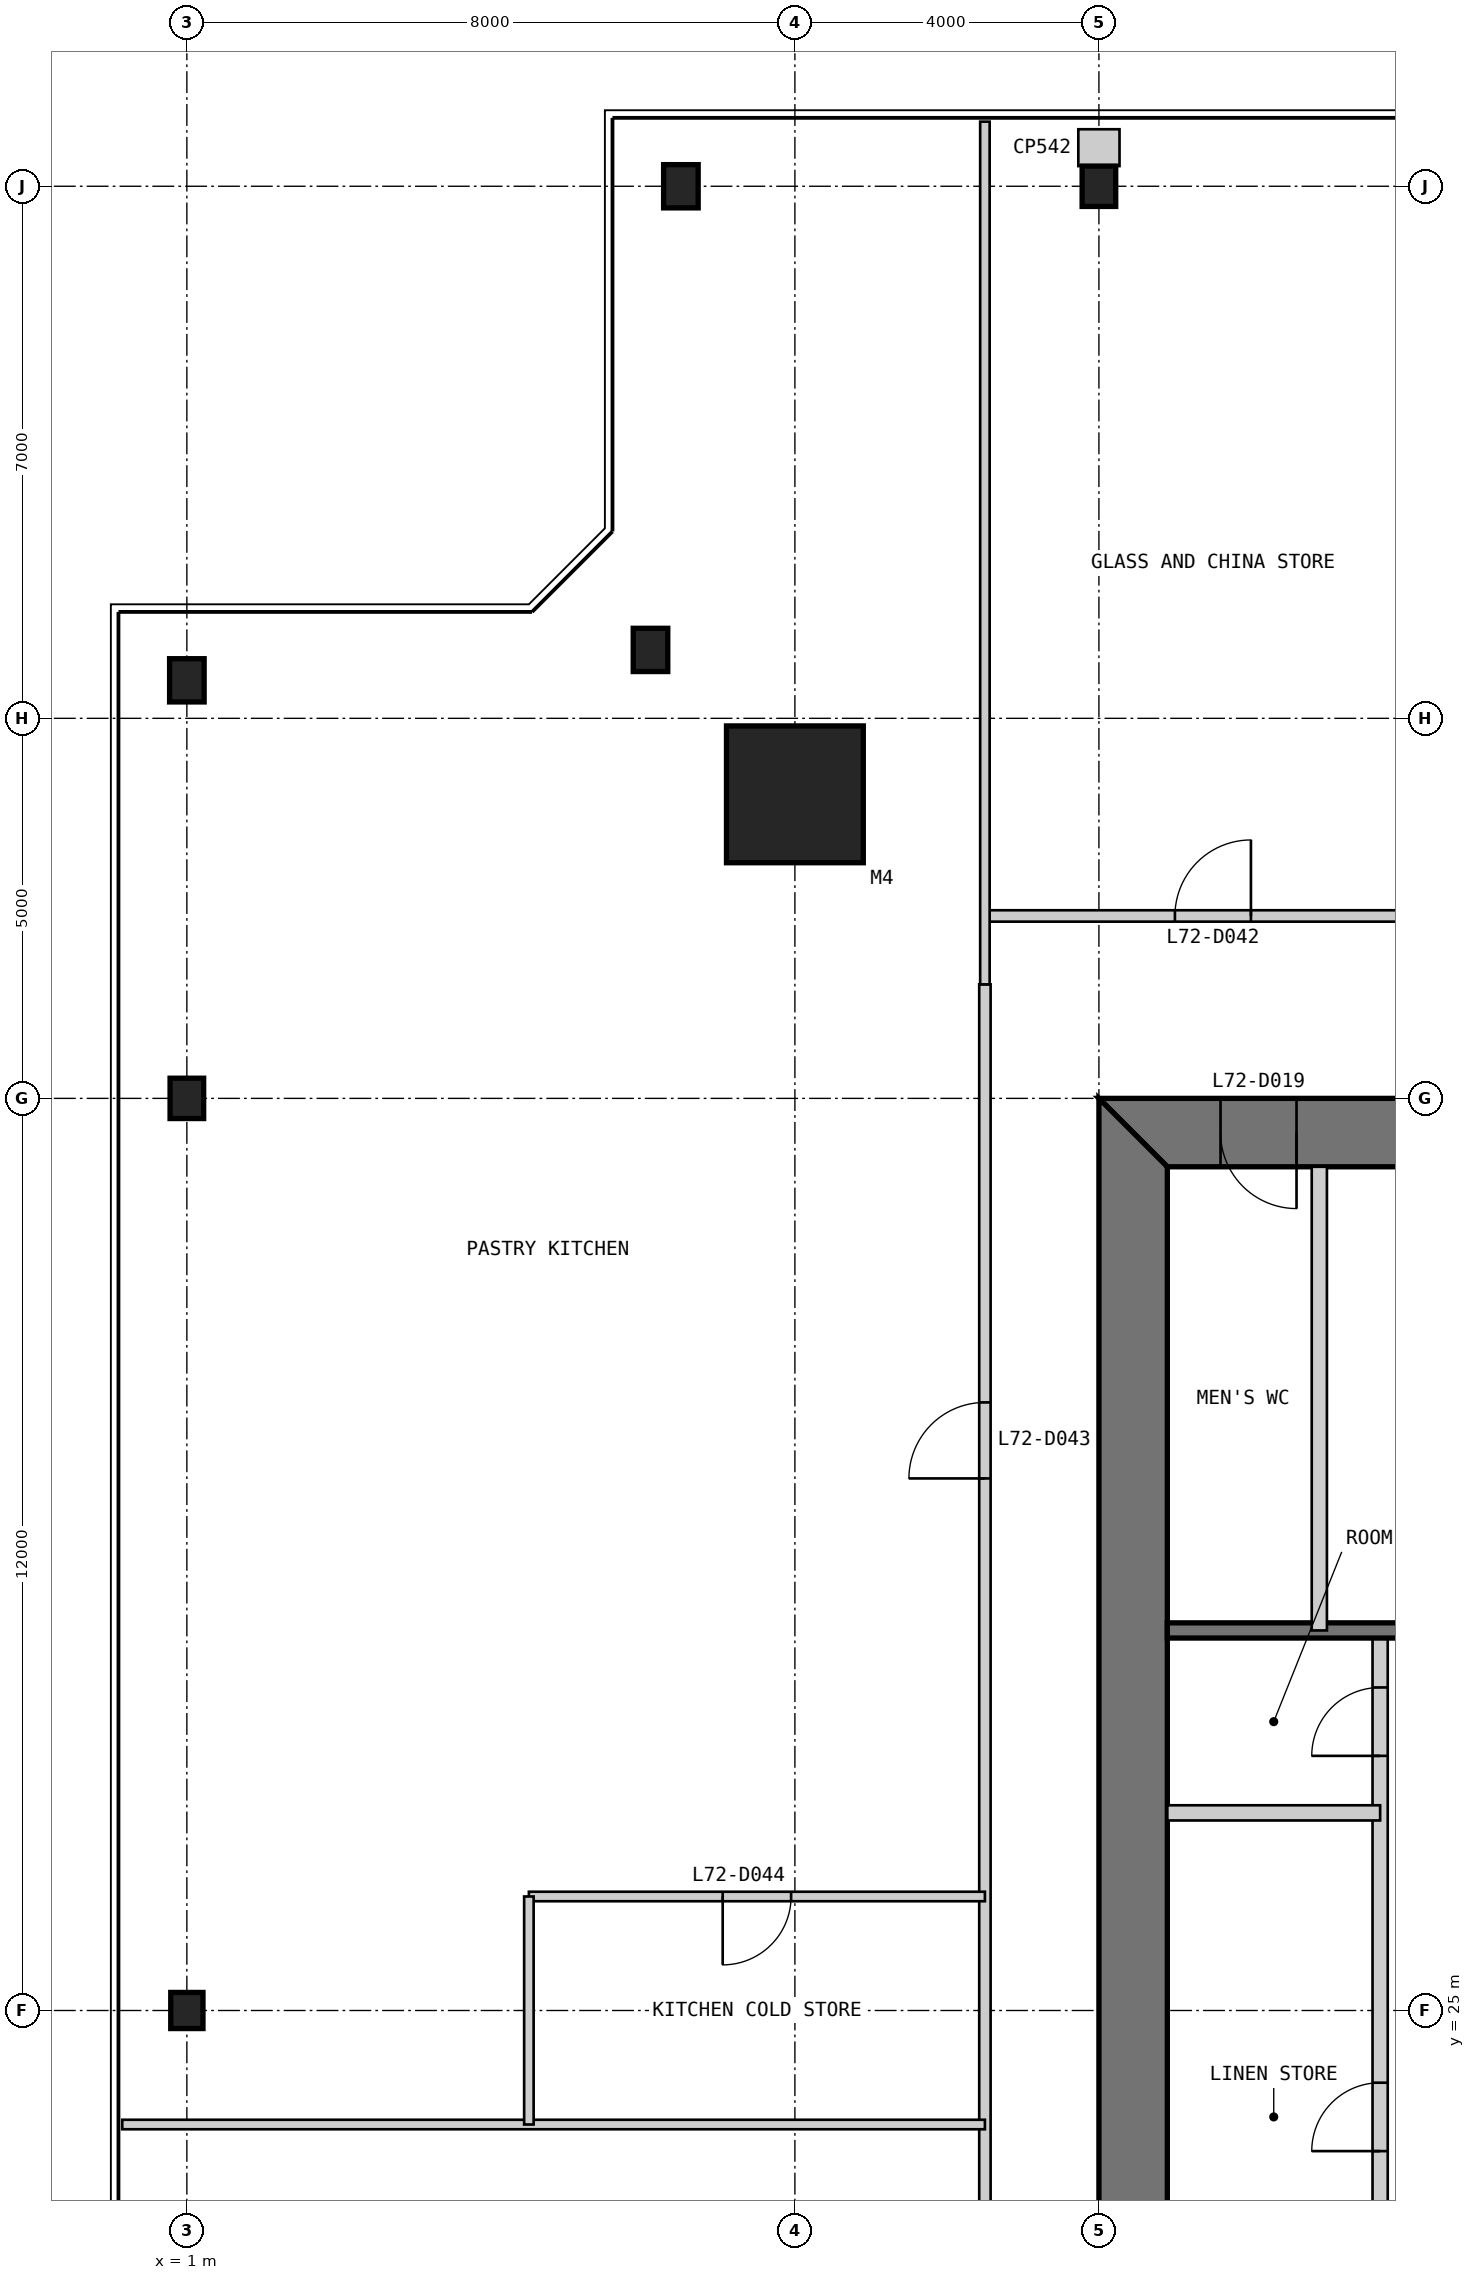
"""IFC4 building model, lengths in metres.
Left out: names, types, materials, properties, quantities, classifications, styles, units other than length and angle.
Written with IfcOpenShell. Run it as: python <this file> out.ifc"""

import sys

from ifc_helpers import new_model, si_unit, direction, frame, frame_2d, origin, origin_2d, place, context, subcontext, project, spatial, polyline, rectangle, i_section, outline, extrude, element, fill, save


model = new_model("IFC4")
c1 = context("Model", 3, precision=1e-05, world=origin(), true_north=direction((0.0, 1.0)))
c2 = subcontext(c1, "Body", "Model", "MODEL_VIEW")
j1 = project(units=[si_unit("LENGTHUNIT", "METRE"), si_unit("PLANEANGLEUNIT", "RADIAN")], contexts=[c1])
p1 = place(None, origin())
s1 = spatial("IfcSite", under=j1, at=p1, CompositionType="ELEMENT")
p2 = place(p1, origin())
s2 = spatial("IfcBuilding", under=s1, at=p2, CompositionType="ELEMENT")
p3 = place(p2, frame((0.0, 0.0, 296.8)))
s3 = spatial("IfcBuildingStorey", under=s2, at=p3, CompositionType="ELEMENT", Elevation=296.8)
p4 = place(p3, frame((9.0, 41.0, 0.0), z_axis=(0.0, 0.0, 1.0), x_axis=(1.0, 0.0, 0.0)))
e1 = element("IfcColumn", 1, at=p4, inside=s3, PredefinedType="COLUMN", context=c2, shape_type="SweptSolid", body=[
    extrude(rectangle(XDim=1.8, YDim=1.8, at=origin_2d()), origin(), (0.0, 0.0, 1.0), 5.0),
])
p5 = place(p3, frame((13.0, 49.0, 0.0), z_axis=(0.0, 0.0, 1.0), x_axis=(1.0, 0.0, 0.0)))
e2 = element("IfcColumn", 2, at=p5, inside=s3, PredefinedType="COLUMN", context=c2, shape_type="SweptSolid", body=[
    extrude(i_section(OverallWidth=0.442, OverallDepth=0.531, WebThickness=0.066, FlangeThickness=0.106, at=origin_2d()), origin(), (0.0, 0.0, 1.0), 5.0),
])
for number, where, z_axis, x_axis in (
    (3, (7.5, 49.0, 0.0), (0.0, 0.0, 1.0), (1.0, 0.0, 0.0)),
    (4, (7.1, 42.9, 0.0), (0.0, 0.0, 1.0), (1.0, 0.0, 0.0)),
    (5, (1.0, 42.5, 0.0), (0.0, 0.0, 1.0), (1.0, 0.0, 0.0)),
):
    element("IfcColumn", number, at=place(p3, frame(where, z_axis=z_axis, x_axis=x_axis)), inside=s3, PredefinedType="COLUMN", context=c2, shape_type="SweptSolid", body=[
        extrude(i_section(OverallWidth=0.455, OverallDepth=0.569, WebThickness=0.078, FlangeThickness=0.125, at=origin_2d()), origin(), (0.0, 0.0, 1.0), 5.0),
    ])
p6 = place(p3, frame((1.0, 37.0, 0.0), z_axis=(0.0, 0.0, 1.0), x_axis=(1.0, 0.0, 0.0)))
e6 = element("IfcColumn", 6, at=p6, inside=s3, PredefinedType="COLUMN", context=c2, shape_type="SweptSolid", body=[
    extrude(i_section(OverallWidth=0.442, OverallDepth=0.531, WebThickness=0.066, FlangeThickness=0.106, at=origin_2d()), origin(), (0.0, 0.0, 1.0), 5.0),
])
p7 = place(p3, frame((1.0, 25.0, 0.0), z_axis=(0.0, 0.0, 1.0), x_axis=(1.0, 0.0, 0.0)))
e7 = element("IfcColumn", 7, at=p7, inside=s3, PredefinedType="COLUMN", context=c2, shape_type="SweptSolid", body=[
    extrude(i_section(OverallWidth=0.424, OverallDepth=0.475, WebThickness=0.048, FlangeThickness=0.077, at=origin_2d()), origin(), (0.0, 0.0, 1.0), 5.0),
])
p8 = place(p3, frame((37.0, 36.55, 0.0), z_axis=(0.0, 0.0, 1.0), x_axis=(-1.0, 0.0, 0.0)))
e8 = element("IfcWall", 8, at=p8, inside=s3, PredefinedType="SHEAR", context=c2, shape_type="SweptSolid", body=[
    extrude(outline(polyline([(0.0, -0.45), (24.0, -0.45), (23.1, 0.45), (0.9, 0.45), (0.0, -0.45)])), origin(), (0.0, 0.0, 1.0), 5.0),
])
p9 = place(p8, frame((4.9, 0.0, 0.0)))
e9 = element("IfcOpeningElement", 9, at=p9, cuts=e8, PredefinedType="OPENING", context=c2, shape_type="SweptSolid", body=[
    extrude(rectangle(XDim=1.0, YDim=2.2, at=frame_2d((0.5, 1.1))), frame((0.0, 0.46, 0.0), z_axis=(0.0, -1.0, 0.0), x_axis=(1.0, 0.0, 0.0)), (0.0, 0.0, 1.0), 0.92),
])
p10 = place(p8, frame((8.9, 0.0, 0.0)))
e10 = element("IfcOpeningElement", 10, at=p10, cuts=e8, PredefinedType="OPENING", context=c2, shape_type="SweptSolid", body=[
    extrude(rectangle(XDim=1.1, YDim=2.2, at=frame_2d((0.55, 1.1))), frame((0.0, 0.46, 0.0), z_axis=(0.0, -1.0, 0.0), x_axis=(1.0, 0.0, 0.0)), (0.0, 0.0, 1.0), 0.92),
])
p11 = place(p8, frame((15.05, 0.0, 0.0)))
e11 = element("IfcOpeningElement", 11, at=p11, cuts=e8, PredefinedType="OPENING", context=c2, shape_type="SweptSolid", body=[
    extrude(rectangle(XDim=0.9, YDim=2.2, at=frame_2d((0.45, 1.1))), frame((0.0, 0.46, 0.0), z_axis=(0.0, -1.0, 0.0), x_axis=(1.0, 0.0, 0.0)), (0.0, 0.0, 1.0), 0.92),
])
p12 = place(p8, frame((17.9, 0.0, 0.0)))
e12 = element("IfcOpeningElement", 12, at=p12, cuts=e8, PredefinedType="OPENING", context=c2, shape_type="SweptSolid", body=[
    extrude(rectangle(XDim=1.0, YDim=2.2, at=frame_2d((0.5, 1.1))), frame((0.0, 0.46, 0.0), z_axis=(0.0, -1.0, 0.0), x_axis=(1.0, 0.0, 0.0)), (0.0, 0.0, 1.0), 0.92),
])
p13 = place(p8, frame((21.4, 0.0, 0.0)))
e13 = element("IfcOpeningElement", 13, at=p13, cuts=e8, PredefinedType="OPENING", context=c2, shape_type="SweptSolid", body=[
    extrude(rectangle(XDim=1.0, YDim=2.2, at=frame_2d((0.5, 1.1))), frame((0.0, 0.46, 0.0), z_axis=(0.0, -1.0, 0.0), x_axis=(1.0, 0.0, 0.0)), (0.0, 0.0, 1.0), 0.92),
])
p14 = place(p3, frame((13.45, 36.1, 0.0), z_axis=(0.0, 0.0, 1.0), x_axis=(0.0, -1.0, 0.0)))
e14 = element("IfcWall", 14, at=p14, inside=s3, PredefinedType="SHEAR", context=c2, shape_type="SweptSolid", body=[
    extrude(outline(polyline([(-0.9, -0.45), (23.1, -0.45), (22.2, 0.45), (0.0, 0.45), (-0.9, -0.45)])), origin(), (0.0, 0.0, 1.0), 5.0),
])
p15 = place(p14, frame((20.2, 0.0, 0.0)))
e15 = element("IfcOpeningElement", 15, at=p15, cuts=e14, PredefinedType="OPENING", context=c2, shape_type="SweptSolid", body=[
    extrude(rectangle(XDim=1.0, YDim=2.2, at=frame_2d((0.5, 1.1))), frame((0.0, 0.46, 0.0), z_axis=(0.0, -1.0, 0.0), x_axis=(1.0, 0.0, 0.0)), (0.0, 0.0, 1.0), 0.92),
])
p16 = place(p14, frame((17.25, 0.0, 0.0)))
e16 = element("IfcOpeningElement", 16, at=p16, cuts=e14, PredefinedType="OPENING", context=c2, shape_type="SweptSolid", body=[
    extrude(rectangle(XDim=0.9, YDim=2.2, at=frame_2d((0.45, 1.1))), frame((0.0, 0.46, 0.0), z_axis=(0.0, -1.0, 0.0), x_axis=(1.0, 0.0, 0.0)), (0.0, 0.0, 1.0), 0.92),
])
p17 = place(p3, frame((16.7, 13.9, 0.0), z_axis=(0.0, 0.0, 1.0), x_axis=(0.0, 1.0, 0.0)))
e17 = element("IfcWall", 17, at=p17, inside=s3, PredefinedType="PARTITIONING", context=c2, shape_type="SweptSolid", body=[
    extrude(rectangle(XDim=16.1, YDim=0.2, at=frame_2d((8.05, 0.0))), origin(), (0.0, 0.0, 1.0), 4.8),
])
p18 = place(p17, frame((9.25, 0.0, 0.0)))
e18 = element("IfcOpeningElement", 18, at=p18, cuts=e17, PredefinedType="OPENING", context=c2, shape_type="SweptSolid", body=[
    extrude(rectangle(XDim=0.9, YDim=2.2, at=frame_2d((0.45, 1.1))), frame((0.0, 0.11, 0.0), z_axis=(0.0, -1.0, 0.0), x_axis=(1.0, 0.0, 0.0)), (0.0, 0.0, 1.0), 0.22),
])
p19 = place(p17, frame((14.45, 0.0, 0.0)))
e19 = element("IfcOpeningElement", 19, at=p19, cuts=e17, PredefinedType="OPENING", context=c2, shape_type="SweptSolid", body=[
    extrude(rectangle(XDim=0.9, YDim=2.2, at=frame_2d((0.45, 1.1))), frame((0.0, 0.11, 0.0), z_axis=(0.0, -1.0, 0.0), x_axis=(1.0, 0.0, 0.0)), (0.0, 0.0, 1.0), 0.22),
])
p20 = place(p3, frame((13.9, 27.6, 0.0), z_axis=(0.0, 0.0, 1.0), x_axis=(1.0, 0.0, 0.0)))
e20 = element("IfcWall", 20, at=p20, inside=s3, PredefinedType="PARTITIONING", context=c2, shape_type="SweptSolid", body=[
    extrude(rectangle(XDim=2.8, YDim=0.2, at=frame_2d((1.4, 0.0))), origin(), (0.0, 0.0, 1.0), 4.8),
])
p21 = place(p3, frame((29.7, 30.0, 0.0), z_axis=(0.0, 0.0, 1.0), x_axis=(-1.0, 0.0, 0.0)))
e21 = element("IfcWall", 21, at=p21, inside=s3, PredefinedType="SOLIDWALL", context=c2, shape_type="SweptSolid", body=[
    extrude(rectangle(XDim=15.8, YDim=0.2, at=frame_2d((7.9, 0.0))), origin(), (0.0, 0.0, 1.0), 4.8),
])
p22 = place(p3, frame((15.9, 36.1, 0.0), z_axis=(0.0, 0.0, 1.0), x_axis=(0.0, -1.0, 0.0)))
e22 = element("IfcWall", 22, at=p22, inside=s3, PredefinedType="PARTITIONING", context=c2, shape_type="SweptSolid", body=[
    extrude(rectangle(XDim=6.1, YDim=0.2, at=frame_2d((3.05, 0.0))), origin(), (0.0, 0.0, 1.0), 4.8),
])
p23 = place(p3, frame((38.5, 39.4, 0.0), z_axis=(0.0, 0.0, 1.0), x_axis=(-1.0, 0.0, 0.0)))
e23 = element("IfcWall", 23, at=p23, inside=s3, PredefinedType="PARTITIONING", context=c2, shape_type="SweptSolid", body=[
    extrude(rectangle(XDim=27.0, YDim=0.15, at=frame_2d((13.5, 0.0))), origin(), (0.0, 0.0, 1.0), 4.8),
])
p24 = place(p23, frame((0.25, 0.0, 0.0)))
e24 = element("IfcOpeningElement", 24, at=p24, cuts=e23, PredefinedType="OPENING", context=c2, shape_type="SweptSolid", body=[
    extrude(rectangle(XDim=1.0, YDim=2.2, at=frame_2d((0.5, 1.1))), frame((0.0, 0.085, 0.0), z_axis=(0.0, -1.0, 0.0), x_axis=(1.0, 0.0, 0.0)), (0.0, 0.0, 1.0), 0.17),
])
p25 = place(p23, frame((10.75, 0.0, 0.0)))
e25 = element("IfcOpeningElement", 25, at=p25, cuts=e23, PredefinedType="OPENING", context=c2, shape_type="SweptSolid", body=[
    extrude(rectangle(XDim=1.0, YDim=2.2, at=frame_2d((0.5, 1.1))), frame((0.0, 0.085, 0.0), z_axis=(0.0, -1.0, 0.0), x_axis=(1.0, 0.0, 0.0)), (0.0, 0.0, 1.0), 0.17),
])
p26 = place(p23, frame((13.0, 0.0, 0.0)))
e26 = element("IfcOpeningElement", 26, at=p26, cuts=e23, PredefinedType="OPENING", context=c2, shape_type="SweptSolid", body=[
    extrude(rectangle(XDim=1.0, YDim=2.2, at=frame_2d((0.5, 1.1))), frame((0.0, 0.085, 0.0), z_axis=(0.0, -1.0, 0.0), x_axis=(1.0, 0.0, 0.0)), (0.0, 0.0, 1.0), 0.17),
])
p27 = place(p23, frame((16.0, 0.0, 0.0)))
e27 = element("IfcOpeningElement", 27, at=p27, cuts=e23, PredefinedType="OPENING", context=c2, shape_type="SweptSolid", body=[
    extrude(rectangle(XDim=1.0, YDim=2.2, at=frame_2d((0.5, 1.1))), frame((0.0, 0.085, 0.0), z_axis=(0.0, -1.0, 0.0), x_axis=(1.0, 0.0, 0.0)), (0.0, 0.0, 1.0), 0.17),
])
p28 = place(p23, frame((19.0, 0.0, 0.0)))
e28 = element("IfcOpeningElement", 28, at=p28, cuts=e23, PredefinedType="OPENING", context=c2, shape_type="SweptSolid", body=[
    extrude(rectangle(XDim=1.0, YDim=2.2, at=frame_2d((0.5, 1.1))), frame((0.0, 0.085, 0.0), z_axis=(0.0, -1.0, 0.0), x_axis=(1.0, 0.0, 0.0)), (0.0, 0.0, 1.0), 0.17),
])
p29 = place(p23, frame((23.5, 0.0, 0.0)))
e29 = element("IfcOpeningElement", 29, at=p29, cuts=e23, PredefinedType="OPENING", context=c2, shape_type="SweptSolid", body=[
    extrude(rectangle(XDim=1.0, YDim=2.2, at=frame_2d((0.5, 1.1))), frame((0.0, 0.085, 0.0), z_axis=(0.0, -1.0, 0.0), x_axis=(1.0, 0.0, 0.0)), (0.0, 0.0, 1.0), 0.17),
])
p30 = place(p3, frame((11.5, 38.5, 0.0), z_axis=(0.0, 0.0, 1.0), x_axis=(0.0, -1.0, 0.0)))
e30 = element("IfcWall", 30, at=p30, inside=s3, PredefinedType="PARTITIONING", context=c2, shape_type="SweptSolid", body=[
    extrude(rectangle(XDim=27.0, YDim=0.15, at=frame_2d((13.5, 0.0))), origin(), (0.0, 0.0, 1.0), 4.8),
])
p31 = place(p30, frame((5.5, 0.0, 0.0)))
e31 = element("IfcOpeningElement", 31, at=p31, cuts=e30, PredefinedType="OPENING", context=c2, shape_type="SweptSolid", body=[
    extrude(rectangle(XDim=1.0, YDim=2.2, at=frame_2d((0.5, 1.1))), frame((0.0, 0.085, 0.0), z_axis=(0.0, -1.0, 0.0), x_axis=(1.0, 0.0, 0.0)), (0.0, 0.0, 1.0), 0.17),
])
p32 = place(p30, frame((17.5, 0.0, 0.0)))
e32 = element("IfcOpeningElement", 32, at=p32, cuts=e30, PredefinedType="OPENING", context=c2, shape_type="SweptSolid", body=[
    extrude(rectangle(XDim=1.0, YDim=2.2, at=frame_2d((0.5, 1.1))), frame((0.0, 0.085, 0.0), z_axis=(0.0, -1.0, 0.0), x_axis=(1.0, 0.0, 0.0)), (0.0, 0.0, 1.0), 0.17),
])
p33 = place(p30, frame((23.5, 0.0, 0.0)))
e33 = element("IfcOpeningElement", 33, at=p33, cuts=e30, PredefinedType="OPENING", context=c2, shape_type="SweptSolid", body=[
    extrude(rectangle(XDim=1.0, YDim=2.2, at=frame_2d((0.5, 1.1))), frame((0.0, 0.085, 0.0), z_axis=(0.0, -1.0, 0.0), x_axis=(1.0, 0.0, 0.0)), (0.0, 0.0, 1.0), 0.17),
])
p34 = place(p3, frame((11.5, 49.85, 0.0), z_axis=(0.0, 0.0, 1.0), x_axis=(0.0, -1.0, 0.0)))
e34 = element("IfcWall", 34, at=p34, inside=s3, PredefinedType="PARTITIONING", context=c2, shape_type="SweptSolid", body=[
    extrude(rectangle(XDim=11.35, YDim=0.125, at=frame_2d((5.675, 0.0))), origin(), (0.0, 0.0, 1.0), 4.8),
])
p35 = place(p3, frame((5.5, 26.5, 0.0), z_axis=(0.0, 0.0, 1.0), x_axis=(1.0, 0.0, 0.0)))
e35 = element("IfcWall", 35, at=p35, inside=s3, PredefinedType="PARTITIONING", context=c2, shape_type="SweptSolid", body=[
    extrude(rectangle(XDim=6.0, YDim=0.125, at=frame_2d((3.0, 0.0))), origin(), (0.0, 0.0, 1.0), 4.8),
])
p36 = place(p35, frame((2.55, 0.0, 0.0)))
e36 = element("IfcOpeningElement", 36, at=p36, cuts=e35, PredefinedType="OPENING", context=c2, shape_type="SweptSolid", body=[
    extrude(rectangle(XDim=0.9, YDim=2.2, at=frame_2d((0.45, 1.1))), frame((0.0, 0.073, 0.0), z_axis=(0.0, -1.0, 0.0), x_axis=(1.0, 0.0, 0.0)), (0.0, 0.0, 1.0), 0.145),
])
p37 = place(p3, frame((0.15, 23.5, 0.0), z_axis=(0.0, 0.0, 1.0), x_axis=(1.0, 0.0, 0.0)))
e37 = element("IfcWall", 37, at=p37, inside=s3, PredefinedType="PARTITIONING", context=c2, shape_type="SweptSolid", body=[
    extrude(rectangle(XDim=11.35, YDim=0.125, at=frame_2d((5.675, 0.0))), origin(), (0.0, 0.0, 1.0), 4.8),
])
p38 = place(p3, frame((5.5, 26.5, 0.0), z_axis=(0.0, 0.0, 1.0), x_axis=(0.0, -1.0, 0.0)))
e38 = element("IfcWall", 38, at=p38, inside=s3, PredefinedType="PARTITIONING", context=c2, shape_type="SweptSolid", body=[
    extrude(rectangle(XDim=3.0, YDim=0.125, at=frame_2d((1.5, 0.0))), origin(), (0.0, 0.0, 1.0), 4.8),
])
p39 = place(p3, frame((13.0, 49.75, 0.0), z_axis=(0.0, 0.0, 1.0), x_axis=(0.0, -1.0, 0.0)))
e39 = element("IfcWall", 39, at=p39, inside=s3, PredefinedType="PARTITIONING", context=c2, shape_type="SweptSolid", body=[
    extrude(rectangle(XDim=0.485, YDim=0.542, at=frame_2d((0.242, 0.0))), origin(), (0.0, 0.0, 1.0), 4.8),
])
p40 = place(p18, origin())
e40 = element("IfcDoor", 40, at=p40, inside=s3, OperationType="SINGLE_SWING_LEFT", PredefinedType="DOOR", context=c2, shape_type="SweptSolid", body=[
    extrude(rectangle(XDim=0.9, YDim=2.2, at=frame_2d((0.45, 1.1))), frame((0.0, 0.025, 0.0), z_axis=(0.0, -1.0, 0.0), x_axis=(1.0, 0.0, 0.0)), (0.0, 0.0, 1.0), 0.05),
])
fill(e18, e40)
p41 = place(p19, origin())
e41 = element("IfcDoor", 41, at=p41, inside=s3, OperationType="SINGLE_SWING_LEFT", PredefinedType="DOOR", context=c2, shape_type="SweptSolid", body=[
    extrude(rectangle(XDim=0.9, YDim=2.2, at=frame_2d((0.45, 1.1))), frame((0.0, 0.025, 0.0), z_axis=(0.0, -1.0, 0.0), x_axis=(1.0, 0.0, 0.0)), (0.0, 0.0, 1.0), 0.05),
])
fill(e19, e41)
p42 = place(p13, origin())
e42 = element("IfcDoor", 42, at=p42, inside=s3, OperationType="SINGLE_SWING_LEFT", PredefinedType="DOOR", context=c2, shape_type="SweptSolid", body=[
    extrude(rectangle(XDim=1.0, YDim=2.2, at=frame_2d((0.5, 1.1))), frame((0.0, 0.025, 0.0), z_axis=(0.0, -1.0, 0.0), x_axis=(1.0, 0.0, 0.0)), (0.0, 0.0, 1.0), 0.05),
    extrude(outline(polyline([(0.0, 0.0), (0.04, 0.0), (0.04, 2.16), (0.96, 2.16), (0.96, 0.0), (1.0, 0.0), (1.0, 2.2), (0.0, 2.2), (0.0, 0.0)])), frame((0.0, 0.3, 0.0), z_axis=(0.0, -1.0, 0.0), x_axis=(1.0, 0.0, 0.0)), (0.0, 0.0, 1.0), 0.6),
])
fill(e13, e42)
p43 = place(p29, frame((1.0, 0.0, 0.0), z_axis=(0.0, 0.0, 1.0), x_axis=(-1.0, 0.0, 0.0)))
e43 = element("IfcDoor", 43, at=p43, inside=s3, OperationType="SINGLE_SWING_RIGHT", PredefinedType="DOOR", context=c2, shape_type="SweptSolid", body=[
    extrude(rectangle(XDim=1.0, YDim=2.2, at=frame_2d((0.5, 1.1))), frame((0.0, 0.025, 0.0), z_axis=(0.0, -1.0, 0.0), x_axis=(1.0, 0.0, 0.0)), (0.0, 0.0, 1.0), 0.05),
])
fill(e29, e43)
p44 = place(p31, frame((1.0, 0.0, 0.0), z_axis=(0.0, 0.0, 1.0), x_axis=(-1.0, 0.0, 0.0)))
e44 = element("IfcDoor", 44, at=p44, inside=s3, OperationType="SINGLE_SWING_LEFT", PredefinedType="DOOR", context=c2, shape_type="SweptSolid", body=[
    extrude(rectangle(XDim=1.0, YDim=2.2, at=frame_2d((0.5, 1.1))), frame((0.0, 0.025, 0.0), z_axis=(0.0, -1.0, 0.0), x_axis=(1.0, 0.0, 0.0)), (0.0, 0.0, 1.0), 0.05),
])
fill(e31, e44)
p45 = place(p36, frame((0.9, 0.0, 0.0), z_axis=(0.0, 0.0, 1.0), x_axis=(-1.0, 0.0, 0.0)))
e45 = element("IfcDoor", 45, at=p45, inside=s3, OperationType="SINGLE_SWING_RIGHT", PredefinedType="DOOR", context=c2, shape_type="SweptSolid", body=[
    extrude(rectangle(XDim=0.9, YDim=2.2, at=frame_2d((0.45, 1.1))), frame((0.0, 0.025, 0.0), z_axis=(0.0, -1.0, 0.0), x_axis=(1.0, 0.0, 0.0)), (0.0, 0.0, 1.0), 0.05),
])
fill(e36, e45)
save(model, sys.argv[1])
